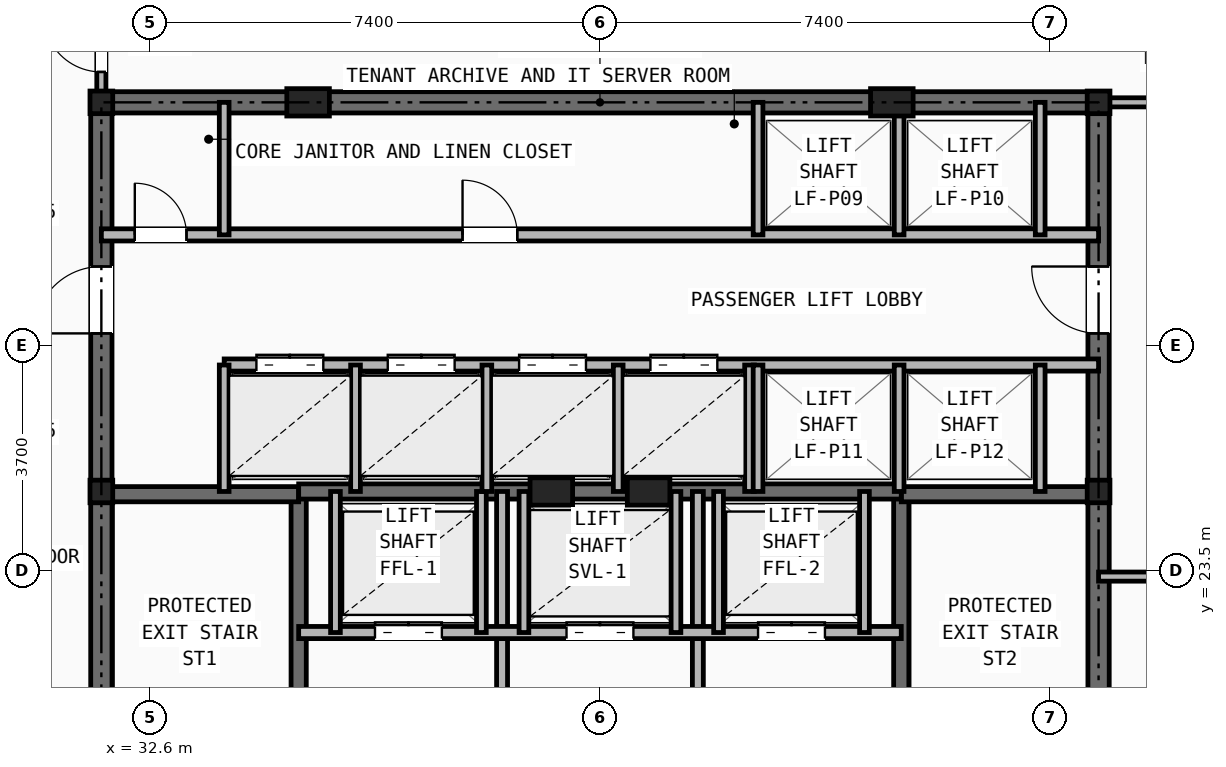
"""IFC4 building model, lengths in metres.
Left out: names, types, materials, properties, quantities, classifications, styles, units other than length and angle.
Written with IfcOpenShell. Run it as: python <this file> out.ifc"""

import sys

from ifc_helpers import new_model, si_unit, direction, frame, frame_2d, origin, origin_2d, place, context, subcontext, project, spatial, rectangle, i_section, extrude, element, fill, save


model = new_model("IFC4")
c1 = context("Model", 3, precision=1e-05, world=origin(), true_north=direction((0.0, 1.0)))
c2 = subcontext(c1, "Body", "Model", "MODEL_VIEW")
j1 = project(units=[si_unit("LENGTHUNIT", "METRE"), si_unit("PLANEANGLEUNIT", "RADIAN")], contexts=[c1])
p1 = place(None, origin())
s1 = spatial("IfcSite", under=j1, at=p1, CompositionType="ELEMENT")
p2 = place(p1, origin())
s2 = spatial("IfcBuilding", under=s1, at=p2, CompositionType="ELEMENT")
p3 = place(p2, frame((0.0, 0.0, 133.25)))
s3 = spatial("IfcBuildingStorey", under=s2, at=p3, CompositionType="ELEMENT", Elevation=133.25)
for number, where, z_axis, x_axis in (
    (1, (31.8, 24.8, 0.0), (0.0, 0.0, 1.0), (1.0, 0.0, 0.0)),
    (2, (48.2, 24.8, 0.0), (0.0, 0.0, 1.0), (1.0, 0.0, 0.0)),
    (3, (31.8, 31.2, 0.0), (0.0, 0.0, 1.0), (1.0, 0.0, 0.0)),
    (4, (48.2, 31.2, 0.0), (0.0, 0.0, 1.0), (1.0, 0.0, 0.0)),
):
    element("IfcColumn", number, at=place(p3, frame(where, z_axis=z_axis, x_axis=x_axis)), inside=s3, PredefinedType="COLUMN", context=c2, shape_type="SweptSolid", body=[
        extrude(i_section(OverallWidth=0.374, OverallDepth=0.372, WebThickness=0.016, FlangeThickness=0.026, at=origin_2d()), origin(), (0.0, 0.0, 1.0), 3.45),
    ])
for number, where, z_axis, x_axis in (
    (5, (35.2, 31.2, 0.0), (0.0, 0.0, 1.0), (1.0, 0.0, 0.0)),
    (6, (44.8, 31.2, 0.0), (0.0, 0.0, 1.0), (1.0, 0.0, 0.0)),
    (7, (39.2, 24.8, 0.0), (0.0, 0.0, 1.0), (1.0, 0.0, 0.0)),
    (8, (40.8, 24.8, 0.0), (0.0, 0.0, 1.0), (1.0, 0.0, 0.0)),
):
    element("IfcColumn", number, at=place(p3, frame(where, z_axis=z_axis, x_axis=x_axis)), inside=s3, PredefinedType="PILASTER", context=c2, shape_type="SweptSolid", body=[
        extrude(rectangle(XDim=0.7, YDim=0.45, at=origin_2d()), origin(), (0.0, 0.0, 1.0), 3.45),
    ])
p4 = place(p3, frame((31.8, 31.2, 0.0), z_axis=(0.0, 0.0, 1.0), x_axis=(1.0, 0.0, 0.0)))
e9 = element("IfcWall", 9, at=p4, inside=s3, PredefinedType="SHEAR", context=c2, shape_type="SweptSolid", body=[
    extrude(rectangle(XDim=16.4, YDim=0.35, at=frame_2d((8.2, 0.0))), origin(), (0.0, 0.0, 1.0), 3.21),
])
p5 = place(p3, frame((31.8, 16.4, 0.0), z_axis=(0.0, 0.0, 1.0), x_axis=(0.0, 1.0, 0.0)))
e10 = element("IfcWall", 10, at=p5, inside=s3, PredefinedType="SHEAR", context=c2, shape_type="SweptSolid", body=[
    extrude(rectangle(XDim=14.8, YDim=0.35, at=frame_2d((7.4, 0.0))), origin(), (0.0, 0.0, 1.0), 3.21),
])
p6 = place(p5, frame((11.0, 0.0, 0.0)))
e11 = element("IfcOpeningElement", 11, at=p6, cuts=e10, PredefinedType="OPENING", context=c2, shape_type="SweptSolid", body=[
    extrude(rectangle(XDim=1.1, YDim=2.15, at=frame_2d((0.55, 1.075))), frame((0.0, 0.185, 0.0), z_axis=(0.0, -1.0, 0.0), x_axis=(1.0, 0.0, 0.0)), (0.0, 0.0, 1.0), 0.37),
])
p7 = place(p3, frame((48.2, 16.4, 0.0), z_axis=(0.0, 0.0, 1.0), x_axis=(0.0, 1.0, 0.0)))
e12 = element("IfcWall", 12, at=p7, inside=s3, PredefinedType="SHEAR", context=c2, shape_type="SweptSolid", body=[
    extrude(rectangle(XDim=14.8, YDim=0.35, at=frame_2d((7.4, 0.0))), origin(), (0.0, 0.0, 1.0), 3.21),
])
p8 = place(p7, frame((11.0, 0.0, 0.0)))
e13 = element("IfcOpeningElement", 13, at=p8, cuts=e12, PredefinedType="OPENING", context=c2, shape_type="SweptSolid", body=[
    extrude(rectangle(XDim=1.1, YDim=2.15, at=frame_2d((0.55, 1.075))), frame((0.0, 0.185, 0.0), z_axis=(0.0, -1.0, 0.0), x_axis=(1.0, 0.0, 0.0)), (0.0, 0.0, 1.0), 0.37),
])
p9 = place(p3, frame((35.045, 16.4, 0.0), z_axis=(0.0, 0.0, 1.0), x_axis=(0.0, 1.0, 0.0)))
e14 = element("IfcWall", 14, at=p9, inside=s3, PredefinedType="SHEAR", context=c2, shape_type="SweptSolid", body=[
    extrude(rectangle(XDim=8.4, YDim=0.25, at=frame_2d((4.2, 0.0))), origin(), (0.0, 0.0, 1.0), 3.21),
])
p10 = place(p9, frame((0.45, 0.0, 0.0)))
e15 = element("IfcOpeningElement", 15, at=p10, cuts=e14, PredefinedType="OPENING", context=c2, shape_type="SweptSolid", body=[
    extrude(rectangle(XDim=0.95, YDim=2.1, at=frame_2d((0.475, 1.05))), frame((0.0, 0.135, 0.0), z_axis=(0.0, -1.0, 0.0), x_axis=(1.0, 0.0, 0.0)), (0.0, 0.0, 1.0), 0.27),
])
p11 = place(p3, frame((31.8, 24.755, 0.0), z_axis=(0.0, 0.0, 1.0), x_axis=(1.0, 0.0, 0.0)))
e16 = element("IfcWall", 16, at=p11, inside=s3, PredefinedType="SHEAR", context=c2, shape_type="SweptSolid", body=[
    extrude(rectangle(XDim=3.245, YDim=0.25, at=frame_2d((1.623, 0.0))), origin(), (0.0, 0.0, 1.0), 3.21),
])
p12 = place(p3, frame((44.955, 16.4, 0.0), z_axis=(0.0, 0.0, 1.0), x_axis=(0.0, 1.0, 0.0)))
e17 = element("IfcWall", 17, at=p12, inside=s3, PredefinedType="SHEAR", context=c2, shape_type="SweptSolid", body=[
    extrude(rectangle(XDim=8.4, YDim=0.25, at=frame_2d((4.2, 0.0))), origin(), (0.0, 0.0, 1.0), 3.21),
])
p13 = place(p12, frame((0.45, 0.0, 0.0)))
e18 = element("IfcOpeningElement", 18, at=p13, cuts=e17, PredefinedType="OPENING", context=c2, shape_type="SweptSolid", body=[
    extrude(rectangle(XDim=0.95, YDim=2.1, at=frame_2d((0.475, 1.05))), frame((0.0, 0.135, 0.0), z_axis=(0.0, -1.0, 0.0), x_axis=(1.0, 0.0, 0.0)), (0.0, 0.0, 1.0), 0.27),
])
p14 = place(p3, frame((44.955, 24.755, 0.0), z_axis=(0.0, 0.0, 1.0), x_axis=(1.0, 0.0, 0.0)))
e19 = element("IfcWall", 19, at=p14, inside=s3, PredefinedType="SHEAR", context=c2, shape_type="SweptSolid", body=[
    extrude(rectangle(XDim=3.245, YDim=0.25, at=frame_2d((1.623, 0.0))), origin(), (0.0, 0.0, 1.0), 3.21),
])
p15 = place(p3, frame((35.045, 24.8, 0.0), z_axis=(0.0, 0.0, 1.0), x_axis=(1.0, 0.0, 0.0)))
e20 = element("IfcWall", 20, at=p15, inside=s3, PredefinedType="SHEAR", context=c2, shape_type="SweptSolid", body=[
    extrude(rectangle(XDim=9.91, YDim=0.25, at=frame_2d((4.955, 0.0))), origin(), (0.0, 0.0, 1.0), 3.21),
])
p16 = place(p3, frame((38.39, 16.4, 0.0), z_axis=(0.0, 0.0, 1.0), x_axis=(0.0, 1.0, 0.0)))
e21 = element("IfcWall", 21, at=p16, inside=s3, PredefinedType="PARTITIONING", context=c2, shape_type="SweptSolid", body=[
    extrude(rectangle(XDim=8.4, YDim=0.18, at=frame_2d((4.2, 0.0))), origin(), (0.0, 0.0, 1.0), 2.661),
])
p17 = place(p16, frame((3.8, 0.0, 0.0)))
e22 = element("IfcOpeningElement", 22, at=p17, cuts=e21, PredefinedType="OPENING", context=c2, shape_type="SweptSolid", body=[
    extrude(rectangle(XDim=0.95, YDim=2.1, at=frame_2d((0.475, 1.05))), frame((0.0, 0.1, 0.0), z_axis=(0.0, -1.0, 0.0), x_axis=(1.0, 0.0, 0.0)), (0.0, 0.0, 1.0), 0.2),
])
p18 = place(p3, frame((41.61, 16.4, 0.0), z_axis=(0.0, 0.0, 1.0), x_axis=(0.0, 1.0, 0.0)))
e23 = element("IfcWall", 23, at=p18, inside=s3, PredefinedType="PARTITIONING", context=c2, shape_type="SweptSolid", body=[
    extrude(rectangle(XDim=8.4, YDim=0.18, at=frame_2d((4.2, 0.0))), origin(), (0.0, 0.0, 1.0), 2.661),
])
p19 = place(p3, frame((35.045, 22.48, 0.0), z_axis=(0.0, 0.0, 1.0), x_axis=(1.0, 0.0, 0.0)))
e24 = element("IfcWall", 24, at=p19, inside=s3, PredefinedType="SOLIDWALL", context=c2, shape_type="SweptSolid", body=[
    extrude(rectangle(XDim=9.91, YDim=0.2, at=frame_2d((4.955, 0.0))), origin(), (0.0, 0.0, 1.0), 3.21),
])
p20 = place(p19, frame((1.255, 0.0, 0.0)))
e25 = element("IfcOpeningElement", 25, at=p20, cuts=e24, PredefinedType="OPENING", context=c2, shape_type="SweptSolid", body=[
    extrude(rectangle(XDim=1.1, YDim=2.15, at=frame_2d((0.55, 1.075))), frame((0.0, 0.11, 0.0), z_axis=(0.0, -1.0, 0.0), x_axis=(1.0, 0.0, 0.0)), (0.0, 0.0, 1.0), 0.22),
])
p21 = place(p19, frame((7.555, 0.0, 0.0)))
e26 = element("IfcOpeningElement", 26, at=p21, cuts=e24, PredefinedType="OPENING", context=c2, shape_type="SweptSolid", body=[
    extrude(rectangle(XDim=1.1, YDim=2.15, at=frame_2d((0.55, 1.075))), frame((0.0, 0.11, 0.0), z_axis=(0.0, -1.0, 0.0), x_axis=(1.0, 0.0, 0.0)), (0.0, 0.0, 1.0), 0.22),
])
p22 = place(p19, frame((4.405, 0.0, 0.0)))
e27 = element("IfcOpeningElement", 27, at=p22, cuts=e24, PredefinedType="OPENING", context=c2, shape_type="SweptSolid", body=[
    extrude(rectangle(XDim=1.1, YDim=2.15, at=frame_2d((0.55, 1.075))), frame((0.0, 0.11, 0.0), z_axis=(0.0, -1.0, 0.0), x_axis=(1.0, 0.0, 0.0)), (0.0, 0.0, 1.0), 0.22),
])
for number, where, z_axis, x_axis in (
    (28, (35.65, 22.48, 0.0), (0.0, 0.0, 1.0), (0.0, 1.0, 0.0)),
    (29, (38.05, 22.48, 0.0), (0.0, 0.0, 1.0), (0.0, 1.0, 0.0)),
    (30, (41.95, 22.48, 0.0), (0.0, 0.0, 1.0), (0.0, 1.0, 0.0)),
    (31, (44.35, 22.48, 0.0), (0.0, 0.0, 1.0), (0.0, 1.0, 0.0)),
    (32, (38.75, 22.48, 0.0), (0.0, 0.0, 1.0), (0.0, 1.0, 0.0)),
    (33, (41.25, 22.48, 0.0), (0.0, 0.0, 1.0), (0.0, 1.0, 0.0)),
):
    element("IfcWall", number, at=place(p3, frame(where, z_axis=z_axis, x_axis=x_axis)), inside=s3, PredefinedType="SOLIDWALL", context=c2, shape_type="SweptSolid", body=[
        extrude(rectangle(XDim=2.32, YDim=0.16, at=frame_2d((1.16, 0.0))), origin(), (0.0, 0.0, 1.0), 3.21),
    ])
p23 = place(p3, frame((31.8, 29.02, 0.0), z_axis=(0.0, 0.0, 1.0), x_axis=(1.0, 0.0, 0.0)))
e34 = element("IfcWall", 34, at=p23, inside=s3, PredefinedType="SOLIDWALL", context=c2, shape_type="SweptSolid", body=[
    extrude(rectangle(XDim=16.4, YDim=0.2, at=frame_2d((8.2, 0.0))), origin(), (0.0, 0.0, 1.0), 2.661),
])
p24 = place(p23, frame((0.55, 0.0, 0.0)))
e35 = element("IfcOpeningElement", 35, at=p24, cuts=e34, PredefinedType="OPENING", context=c2, shape_type="SweptSolid", body=[
    extrude(rectangle(XDim=0.85, YDim=2.05, at=frame_2d((0.425, 1.025))), frame((0.0, 0.11, 0.0), z_axis=(0.0, -1.0, 0.0), x_axis=(1.0, 0.0, 0.0)), (0.0, 0.0, 1.0), 0.22),
])
p25 = place(p23, frame((5.94, 0.0, 0.0)))
e36 = element("IfcOpeningElement", 36, at=p25, cuts=e34, PredefinedType="OPENING", context=c2, shape_type="SweptSolid", body=[
    extrude(rectangle(XDim=0.9, YDim=2.1, at=frame_2d((0.45, 1.05))), frame((0.0, 0.11, 0.0), z_axis=(0.0, -1.0, 0.0), x_axis=(1.0, 0.0, 0.0)), (0.0, 0.0, 1.0), 0.22),
])
p26 = place(p3, frame((33.82, 26.88, 0.0), z_axis=(0.0, 0.0, 1.0), x_axis=(1.0, 0.0, 0.0)))
e37 = element("IfcWall", 37, at=p26, inside=s3, PredefinedType="SOLIDWALL", context=c2, shape_type="SweptSolid", body=[
    extrude(rectangle(XDim=14.38, YDim=0.2, at=frame_2d((7.19, 0.0))), origin(), (0.0, 0.0, 1.0), 2.661),
])
p27 = place(p26, frame((0.53, 0.0, 0.0)))
e38 = element("IfcOpeningElement", 38, at=p27, cuts=e37, PredefinedType="OPENING", context=c2, shape_type="SweptSolid", body=[
    extrude(rectangle(XDim=1.1, YDim=2.15, at=frame_2d((0.55, 1.075))), frame((0.0, 0.11, 0.0), z_axis=(0.0, -1.0, 0.0), x_axis=(1.0, 0.0, 0.0)), (0.0, 0.0, 1.0), 0.22),
])
p28 = place(p26, frame((2.69, 0.0, 0.0)))
e39 = element("IfcOpeningElement", 39, at=p28, cuts=e37, PredefinedType="OPENING", context=c2, shape_type="SweptSolid", body=[
    extrude(rectangle(XDim=1.1, YDim=2.15, at=frame_2d((0.55, 1.075))), frame((0.0, 0.11, 0.0), z_axis=(0.0, -1.0, 0.0), x_axis=(1.0, 0.0, 0.0)), (0.0, 0.0, 1.0), 0.22),
])
p29 = place(p26, frame((4.85, 0.0, 0.0)))
e40 = element("IfcOpeningElement", 40, at=p29, cuts=e37, PredefinedType="OPENING", context=c2, shape_type="SweptSolid", body=[
    extrude(rectangle(XDim=1.1, YDim=2.15, at=frame_2d((0.55, 1.075))), frame((0.0, 0.11, 0.0), z_axis=(0.0, -1.0, 0.0), x_axis=(1.0, 0.0, 0.0)), (0.0, 0.0, 1.0), 0.22),
])
p30 = place(p26, frame((7.01, 0.0, 0.0)))
e41 = element("IfcOpeningElement", 41, at=p30, cuts=e37, PredefinedType="OPENING", context=c2, shape_type="SweptSolid", body=[
    extrude(rectangle(XDim=1.1, YDim=2.15, at=frame_2d((0.55, 1.075))), frame((0.0, 0.11, 0.0), z_axis=(0.0, -1.0, 0.0), x_axis=(1.0, 0.0, 0.0)), (0.0, 0.0, 1.0), 0.22),
])
p31 = place(p3, frame((33.82, 29.02, 0.0), z_axis=(0.0, 0.0, 1.0), x_axis=(0.0, 1.0, 0.0)))
e42 = element("IfcWall", 42, at=p31, inside=s3, PredefinedType="SOLIDWALL", context=c2, shape_type="SweptSolid", body=[
    extrude(rectangle(XDim=2.18, YDim=0.16, at=frame_2d((1.09, 0.0))), origin(), (0.0, 0.0, 1.0), 2.661),
])
for number, where, z_axis, x_axis in (
    (43, (33.82, 24.8, 0.0), (0.0, 0.0, 1.0), (0.0, 1.0, 0.0)),
    (44, (35.98, 24.8, 0.0), (0.0, 0.0, 1.0), (0.0, 1.0, 0.0)),
    (45, (38.14, 24.8, 0.0), (0.0, 0.0, 1.0), (0.0, 1.0, 0.0)),
    (46, (40.3, 24.8, 0.0), (0.0, 0.0, 1.0), (0.0, 1.0, 0.0)),
    (47, (42.46, 24.8, 0.0), (0.0, 0.0, 1.0), (0.0, 1.0, 0.0)),
):
    element("IfcWall", number, at=place(p3, frame(where, z_axis=z_axis, x_axis=x_axis)), inside=s3, PredefinedType="SOLIDWALL", context=c2, shape_type="SweptSolid", body=[
        extrude(rectangle(XDim=2.08, YDim=0.16, at=frame_2d((1.04, 0.0))), origin(), (0.0, 0.0, 1.0), 3.21),
    ])
for number, where, z_axis, x_axis in (
    (48, (42.6, 29.02, 0.0), (0.0, 0.0, 1.0), (0.0, 1.0, 0.0)),
    (49, (44.92, 29.02, 0.0), (0.0, 0.0, 1.0), (0.0, 1.0, 0.0)),
    (50, (47.24, 29.02, 0.0), (0.0, 0.0, 1.0), (0.0, 1.0, 0.0)),
):
    element("IfcWall", number, at=place(p3, frame(where, z_axis=z_axis, x_axis=x_axis)), inside=s3, PredefinedType="SOLIDWALL", context=c2, shape_type="SweptSolid", body=[
        extrude(rectangle(XDim=2.18, YDim=0.16, at=frame_2d((1.09, 0.0))), origin(), (0.0, 0.0, 1.0), 2.661),
    ])
for number, where, z_axis, x_axis in (
    (51, (42.6, 24.8, 0.0), (0.0, 0.0, 1.0), (0.0, 1.0, 0.0)),
    (52, (44.92, 24.8, 0.0), (0.0, 0.0, 1.0), (0.0, 1.0, 0.0)),
    (53, (47.24, 24.8, 0.0), (0.0, 0.0, 1.0), (0.0, 1.0, 0.0)),
):
    element("IfcWall", number, at=place(p3, frame(where, z_axis=z_axis, x_axis=x_axis)), inside=s3, PredefinedType="SOLIDWALL", context=c2, shape_type="SweptSolid", body=[
        extrude(rectangle(XDim=2.08, YDim=0.16, at=frame_2d((1.04, 0.0))), origin(), (0.0, 0.0, 1.0), 3.21),
    ])
p32 = place(p3, frame((31.8, 31.2, 0.0), z_axis=(0.0, 0.0, 1.0), x_axis=(0.0, 1.0, 0.0)))
e54 = element("IfcWall", 54, at=p32, inside=s3, PredefinedType="PARTITIONING", context=c2, shape_type="SweptSolid", body=[
    extrude(rectangle(XDim=5.3, YDim=0.15, at=frame_2d((2.65, 0.0))), origin(), (0.0, 0.0, 1.0), 2.252),
])
p33 = place(p32, frame((0.5, 0.0, 0.0)))
e55 = element("IfcOpeningElement", 55, at=p33, cuts=e54, PredefinedType="OPENING", context=c2, shape_type="SweptSolid", body=[
    extrude(rectangle(XDim=0.95, YDim=2.1, at=frame_2d((0.475, 1.05))), frame((0.0, 0.085, 0.0), z_axis=(0.0, -1.0, 0.0), x_axis=(1.0, 0.0, 0.0)), (0.0, 0.0, 1.0), 0.17),
])
p34 = place(p32, frame((2.9, 0.0, 0.0)))
e56 = element("IfcOpeningElement", 56, at=p34, cuts=e54, PredefinedType="OPENING", context=c2, shape_type="SweptSolid", body=[
    extrude(rectangle(XDim=0.95, YDim=2.1, at=frame_2d((0.475, 1.05))), frame((0.0, 0.085, 0.0), z_axis=(0.0, -1.0, 0.0), x_axis=(1.0, 0.0, 0.0)), (0.0, 0.0, 1.0), 0.17),
])
p35 = place(p3, frame((48.2, 31.2, 0.0), z_axis=(0.0, 0.0, 1.0), x_axis=(1.0, 0.0, 0.0)))
e57 = element("IfcWall", 57, at=p35, inside=s3, PredefinedType="PARTITIONING", context=c2, shape_type="SweptSolid", body=[
    extrude(rectangle(XDim=8.65, YDim=0.15, at=frame_2d((4.325, 0.0))), origin(), (0.0, 0.0, 1.0), 2.252),
])
p36 = place(p3, frame((48.2, 23.4, 0.0), z_axis=(0.0, 0.0, 1.0), x_axis=(1.0, 0.0, 0.0)))
e58 = element("IfcWall", 58, at=p36, inside=s3, PredefinedType="PARTITIONING", context=c2, shape_type="SweptSolid", body=[
    extrude(rectangle(XDim=13.225, YDim=0.15, at=frame_2d((6.612, 0.0))), origin(), (0.0, 0.0, 1.0), 2.589),
])
p37 = place(p36, frame((1.4, 0.0, 0.0)))
e59 = element("IfcOpeningElement", 59, at=p37, cuts=e58, PredefinedType="OPENING", context=c2, shape_type="SweptSolid", body=[
    extrude(rectangle(XDim=0.95, YDim=2.1, at=frame_2d((0.475, 1.05))), frame((0.0, 0.085, 0.0), z_axis=(0.0, -1.0, 0.0), x_axis=(1.0, 0.0, 0.0)), (0.0, 0.0, 1.0), 0.17),
])
p38 = place(p20, origin())
e60 = element("IfcDoor", 60, at=p38, inside=s3, OperationType="DOUBLE_DOOR_SLIDING", PredefinedType="DOOR", context=c2, shape_type="SweptSolid", body=[
    extrude(rectangle(XDim=1.1, YDim=2.15, at=frame_2d((0.55, 1.075))), frame((0.0, 0.025, 0.0), z_axis=(0.0, -1.0, 0.0), x_axis=(1.0, 0.0, 0.0)), (0.0, 0.0, 1.0), 0.05),
])
fill(e25, e60)
p39 = place(p21, origin())
e61 = element("IfcDoor", 61, at=p39, inside=s3, OperationType="DOUBLE_DOOR_SLIDING", PredefinedType="DOOR", context=c2, shape_type="SweptSolid", body=[
    extrude(rectangle(XDim=1.1, YDim=2.15, at=frame_2d((0.55, 1.075))), frame((0.0, 0.025, 0.0), z_axis=(0.0, -1.0, 0.0), x_axis=(1.0, 0.0, 0.0)), (0.0, 0.0, 1.0), 0.05),
])
fill(e26, e61)
p40 = place(p22, origin())
e62 = element("IfcDoor", 62, at=p40, inside=s3, OperationType="DOUBLE_DOOR_SLIDING", PredefinedType="DOOR", context=c2, shape_type="SweptSolid", body=[
    extrude(rectangle(XDim=1.1, YDim=2.15, at=frame_2d((0.55, 1.075))), frame((0.0, 0.025, 0.0), z_axis=(0.0, -1.0, 0.0), x_axis=(1.0, 0.0, 0.0)), (0.0, 0.0, 1.0), 0.05),
])
fill(e27, e62)
p41 = place(p24, origin())
e63 = element("IfcDoor", 63, at=p41, inside=s3, OperationType="SINGLE_SWING_LEFT", PredefinedType="DOOR", context=c2, shape_type="SweptSolid", body=[
    extrude(rectangle(XDim=0.85, YDim=2.05, at=frame_2d((0.425, 1.025))), frame((0.0, 0.025, 0.0), z_axis=(0.0, -1.0, 0.0), x_axis=(1.0, 0.0, 0.0)), (0.0, 0.0, 1.0), 0.05),
])
fill(e35, e63)
p42 = place(p6, origin())
e64 = element("IfcDoor", 64, at=p42, inside=s3, OperationType="SINGLE_SWING_LEFT", PredefinedType="DOOR", context=c2, shape_type="SweptSolid", body=[
    extrude(rectangle(XDim=1.1, YDim=2.15, at=frame_2d((0.55, 1.075))), frame((0.0, 0.025, 0.0), z_axis=(0.0, -1.0, 0.0), x_axis=(1.0, 0.0, 0.0)), (0.0, 0.0, 1.0), 0.05),
])
fill(e11, e64)
p43 = place(p8, origin())
e65 = element("IfcDoor", 65, at=p43, inside=s3, OperationType="SINGLE_SWING_RIGHT", PredefinedType="DOOR", context=c2, shape_type="SweptSolid", body=[
    extrude(rectangle(XDim=1.1, YDim=2.15, at=frame_2d((0.55, 1.075))), frame((0.0, 0.025, 0.0), z_axis=(0.0, -1.0, 0.0), x_axis=(1.0, 0.0, 0.0)), (0.0, 0.0, 1.0), 0.05),
])
fill(e13, e65)
p44 = place(p25, origin())
e66 = element("IfcDoor", 66, at=p44, inside=s3, OperationType="SINGLE_SWING_LEFT", PredefinedType="DOOR", context=c2, shape_type="SweptSolid", body=[
    extrude(rectangle(XDim=0.9, YDim=2.1, at=frame_2d((0.45, 1.05))), frame((0.0, 0.025, 0.0), z_axis=(0.0, -1.0, 0.0), x_axis=(1.0, 0.0, 0.0)), (0.0, 0.0, 1.0), 0.05),
])
fill(e36, e66)
p45 = place(p27, origin())
e67 = element("IfcDoor", 67, at=p45, inside=s3, OperationType="DOUBLE_DOOR_SLIDING", PredefinedType="DOOR", context=c2, shape_type="SweptSolid", body=[
    extrude(rectangle(XDim=1.1, YDim=2.15, at=frame_2d((0.55, 1.075))), frame((0.0, 0.025, 0.0), z_axis=(0.0, -1.0, 0.0), x_axis=(1.0, 0.0, 0.0)), (0.0, 0.0, 1.0), 0.05),
])
fill(e38, e67)
p46 = place(p28, origin())
e68 = element("IfcDoor", 68, at=p46, inside=s3, OperationType="DOUBLE_DOOR_SLIDING", PredefinedType="DOOR", context=c2, shape_type="SweptSolid", body=[
    extrude(rectangle(XDim=1.1, YDim=2.15, at=frame_2d((0.55, 1.075))), frame((0.0, 0.025, 0.0), z_axis=(0.0, -1.0, 0.0), x_axis=(1.0, 0.0, 0.0)), (0.0, 0.0, 1.0), 0.05),
])
fill(e39, e68)
p47 = place(p29, origin())
e69 = element("IfcDoor", 69, at=p47, inside=s3, OperationType="DOUBLE_DOOR_SLIDING", PredefinedType="DOOR", context=c2, shape_type="SweptSolid", body=[
    extrude(rectangle(XDim=1.1, YDim=2.15, at=frame_2d((0.55, 1.075))), frame((0.0, 0.025, 0.0), z_axis=(0.0, -1.0, 0.0), x_axis=(1.0, 0.0, 0.0)), (0.0, 0.0, 1.0), 0.05),
])
fill(e40, e69)
p48 = place(p30, origin())
e70 = element("IfcDoor", 70, at=p48, inside=s3, OperationType="DOUBLE_DOOR_SLIDING", PredefinedType="DOOR", context=c2, shape_type="SweptSolid", body=[
    extrude(rectangle(XDim=1.1, YDim=2.15, at=frame_2d((0.55, 1.075))), frame((0.0, 0.025, 0.0), z_axis=(0.0, -1.0, 0.0), x_axis=(1.0, 0.0, 0.0)), (0.0, 0.0, 1.0), 0.05),
])
fill(e41, e70)
p49 = place(p33, origin())
e71 = element("IfcDoor", 71, at=p49, inside=s3, OperationType="SINGLE_SWING_RIGHT", PredefinedType="DOOR", context=c2, shape_type="SweptSolid", body=[
    extrude(rectangle(XDim=0.95, YDim=2.1, at=frame_2d((0.475, 1.05))), frame((0.0, 0.025, 0.0), z_axis=(0.0, -1.0, 0.0), x_axis=(1.0, 0.0, 0.0)), (0.0, 0.0, 1.0), 0.05),
])
fill(e55, e71)
save(model, sys.argv[1])
